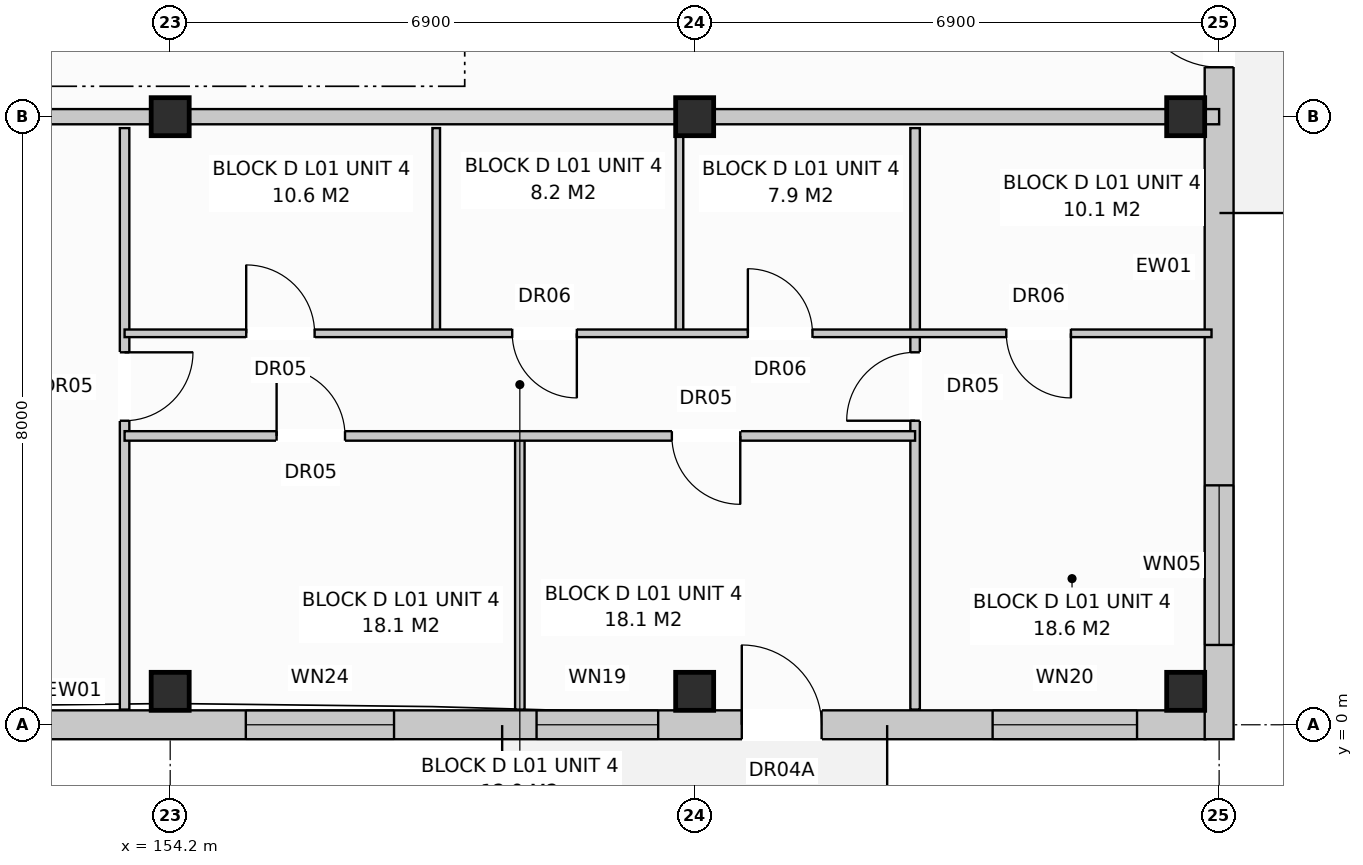
"""IFC4 building model, lengths in metres.
Left out: names, types, materials, properties, quantities, classifications, styles, units other than length and angle.
Written with IfcOpenShell. Run it as: python <this file> out.ifc"""

import sys

from ifc_helpers import new_model, si_unit, direction, frame, frame_2d, origin, origin_with_axes, origin_2d, place, context, subcontext, project, spatial, rectangle, extrude, element, fill, save


model = new_model("IFC4")
c1 = context("Model", 3, precision=1e-05, world=origin(), true_north=direction((0.0, 1.0)))
c2 = subcontext(c1, "Body", "Model", "MODEL_VIEW")
j1 = project(units=[si_unit("LENGTHUNIT", "METRE"), si_unit("PLANEANGLEUNIT", "RADIAN")], contexts=[c1])
p1 = place(None, origin())
s1 = spatial("IfcSite", under=j1, at=p1, CompositionType="ELEMENT")
p2 = place(p1, origin())
s2 = spatial("IfcBuilding", under=s1, at=p2, CompositionType="ELEMENT")
p3 = place(p2, frame((0.0, 0.0, 4.4)))
s3 = spatial("IfcBuildingStorey", under=s2, at=p3, CompositionType="ELEMENT", Elevation=4.4)
for number, where, z_axis, x_axis in (
    (1, (154.2, 0.44, 0.0), (0.0, 0.0, 1.0), (1.0, 0.0, 0.0)),
    (2, (154.2, 8.0, 0.0), (0.0, 0.0, 1.0), (1.0, 0.0, 0.0)),
    (3, (161.1, 0.44, 0.0), (0.0, 0.0, 1.0), (1.0, 0.0, 0.0)),
    (4, (161.1, 8.0, 0.0), (0.0, 0.0, 1.0), (1.0, 0.0, 0.0)),
    (5, (167.56, 0.44, 0.0), (0.0, 0.0, 1.0), (1.0, 0.0, 0.0)),
    (6, (167.56, 8.0, 0.0), (0.0, 0.0, 1.0), (1.0, 0.0, 0.0)),
):
    element("IfcColumn", number, at=place(p3, frame(where, z_axis=z_axis, x_axis=x_axis)), inside=s3, PredefinedType="COLUMN", context=c2, shape_type="SweptSolid", body=[
        extrude(rectangle(XDim=0.5, YDim=0.5, at=origin_2d()), origin(), (0.0, 0.0, 1.0), 3.6),
    ])
p4 = place(p3, frame((112.98, 0.0, 0.0), z_axis=(0.0, 0.0, 1.0), x_axis=(1.0, 0.0, 0.0)))
e7 = element("IfcWall", 7, at=p4, inside=s3, PredefinedType="STANDARD", context=c2, shape_type="SweptSolid", body=[
    extrude(rectangle(XDim=54.84, YDim=0.38, at=frame_2d((27.42, 0.0))), origin(), (0.0, 0.0, 1.0), 3.33),
])
p5 = place(p4, frame((5.04, 0.0, 0.0)))
e8 = element("IfcOpeningElement", 8, at=p5, cuts=e7, PredefinedType="OPENING", context=c2, shape_type="SweptSolid", body=[
    extrude(rectangle(XDim=1.05, YDim=2.12, at=frame_2d((0.525, 1.06))), frame((0.0, 0.202, 0.0), z_axis=(0.0, -1.0, 0.0), x_axis=(1.0, 0.0, 0.0)), (0.0, 0.0, 1.0), 0.404),
])
p6 = place(p4, frame((18.857, 0.0, 0.0)))
e9 = element("IfcOpeningElement", 9, at=p6, cuts=e7, PredefinedType="OPENING", context=c2, shape_type="SweptSolid", body=[
    extrude(rectangle(XDim=1.05, YDim=2.12, at=frame_2d((0.525, 1.06))), frame((0.0, 0.202, 0.0), z_axis=(0.0, -1.0, 0.0), x_axis=(1.0, 0.0, 0.0)), (0.0, 0.0, 1.0), 0.404),
])
p7 = place(p4, frame((32.657, 0.0, 0.0)))
e10 = element("IfcOpeningElement", 10, at=p7, cuts=e7, PredefinedType="OPENING", context=c2, shape_type="SweptSolid", body=[
    extrude(rectangle(XDim=1.05, YDim=2.12, at=frame_2d((0.525, 1.06))), frame((0.0, 0.202, 0.0), z_axis=(0.0, -1.0, 0.0), x_axis=(1.0, 0.0, 0.0)), (0.0, 0.0, 1.0), 0.404),
])
p8 = place(p4, frame((48.74, 0.0, 0.0)))
e11 = element("IfcOpeningElement", 11, at=p8, cuts=e7, PredefinedType="OPENING", context=c2, shape_type="SweptSolid", body=[
    extrude(rectangle(XDim=1.05, YDim=2.12, at=frame_2d((0.525, 1.06))), frame((0.0, 0.202, 0.0), z_axis=(0.0, -1.0, 0.0), x_axis=(1.0, 0.0, 0.0)), (0.0, 0.0, 1.0), 0.404),
])
p9 = place(p4, frame((0.89, 0.0, 0.8)))
e12 = element("IfcOpeningElement", 12, at=p9, cuts=e7, PredefinedType="OPENING", context=c2, shape_type="SweptSolid", body=[
    extrude(rectangle(XDim=1.8, YDim=1.7, at=frame_2d((0.9, 0.85))), frame((0.0, 0.202, 0.0), z_axis=(0.0, -1.0, 0.0), x_axis=(1.0, 0.0, 0.0)), (0.0, 0.0, 1.0), 0.404),
])
p10 = place(p4, frame((7.94, 0.0, 0.8)))
e13 = element("IfcOpeningElement", 13, at=p10, cuts=e7, PredefinedType="OPENING", context=c2, shape_type="SweptSolid", body=[
    extrude(rectangle(XDim=1.9, YDim=1.85, at=frame_2d((0.95, 0.925))), frame((0.0, 0.202, 0.0), z_axis=(0.0, -1.0, 0.0), x_axis=(1.0, 0.0, 0.0)), (0.0, 0.0, 1.0), 0.404),
])
p11 = place(p4, frame((11.215, 0.0, 0.8)))
e14 = element("IfcOpeningElement", 14, at=p11, cuts=e7, PredefinedType="OPENING", context=c2, shape_type="SweptSolid", body=[
    extrude(rectangle(XDim=1.95, YDim=1.65, at=frame_2d((0.975, 0.825))), frame((0.0, 0.202, 0.0), z_axis=(0.0, -1.0, 0.0), x_axis=(1.0, 0.0, 0.0)), (0.0, 0.0, 1.0), 0.404),
])
p12 = place(p4, frame((16.79, 0.0, 0.8)))
e15 = element("IfcOpeningElement", 15, at=p12, cuts=e7, PredefinedType="OPENING", context=c2, shape_type="SweptSolid", body=[
    extrude(rectangle(XDim=1.8, YDim=1.7, at=frame_2d((0.9, 0.85))), frame((0.0, 0.202, 0.0), z_axis=(0.0, -1.0, 0.0), x_axis=(1.0, 0.0, 0.0)), (0.0, 0.0, 1.0), 0.404),
])
p13 = place(p4, frame((22.24, 0.0, 0.8)))
e16 = element("IfcOpeningElement", 16, at=p13, cuts=e7, PredefinedType="OPENING", context=c2, shape_type="SweptSolid", body=[
    extrude(rectangle(XDim=1.9, YDim=1.85, at=frame_2d((0.95, 0.925))), frame((0.0, 0.202, 0.0), z_axis=(0.0, -1.0, 0.0), x_axis=(1.0, 0.0, 0.0)), (0.0, 0.0, 1.0), 0.404),
])
p14 = place(p4, frame((27.873, 0.0, 0.8)))
e17 = element("IfcOpeningElement", 17, at=p14, cuts=e7, PredefinedType="OPENING", context=c2, shape_type="SweptSolid", body=[
    extrude(rectangle(XDim=1.95, YDim=1.65, at=frame_2d((0.975, 0.825))), frame((0.0, 0.202, 0.0), z_axis=(0.0, -1.0, 0.0), x_axis=(1.0, 0.0, 0.0)), (0.0, 0.0, 1.0), 0.404),
])
p15 = place(p4, frame((30.59, 0.0, 0.8)))
e18 = element("IfcOpeningElement", 18, at=p15, cuts=e7, PredefinedType="OPENING", context=c2, shape_type="SweptSolid", body=[
    extrude(rectangle(XDim=1.8, YDim=1.7, at=frame_2d((0.9, 0.85))), frame((0.0, 0.202, 0.0), z_axis=(0.0, -1.0, 0.0), x_axis=(1.0, 0.0, 0.0)), (0.0, 0.0, 1.0), 0.404),
])
p16 = place(p4, frame((36.54, 0.0, 0.8)))
e19 = element("IfcOpeningElement", 19, at=p16, cuts=e7, PredefinedType="OPENING", context=c2, shape_type="SweptSolid", body=[
    extrude(rectangle(XDim=1.9, YDim=1.85, at=frame_2d((0.95, 0.925))), frame((0.0, 0.202, 0.0), z_axis=(0.0, -1.0, 0.0), x_axis=(1.0, 0.0, 0.0)), (0.0, 0.0, 1.0), 0.404),
])
p17 = place(p4, frame((42.215, 0.0, 0.8)))
e20 = element("IfcOpeningElement", 20, at=p17, cuts=e7, PredefinedType="OPENING", context=c2, shape_type="SweptSolid", body=[
    extrude(rectangle(XDim=1.95, YDim=1.65, at=frame_2d((0.975, 0.825))), frame((0.0, 0.202, 0.0), z_axis=(0.0, -1.0, 0.0), x_axis=(1.0, 0.0, 0.0)), (0.0, 0.0, 1.0), 0.404),
])
p18 = place(p4, frame((46.04, 0.0, 0.85)))
e21 = element("IfcOpeningElement", 21, at=p18, cuts=e7, PredefinedType="OPENING", context=c2, shape_type="SweptSolid", body=[
    extrude(rectangle(XDim=1.6, YDim=1.85, at=frame_2d((0.8, 0.925))), frame((0.0, 0.202, 0.0), z_axis=(0.0, -1.0, 0.0), x_axis=(1.0, 0.0, 0.0)), (0.0, 0.0, 1.0), 0.404),
])
p19 = place(p4, frame((52.04, 0.0, 0.8)))
e22 = element("IfcOpeningElement", 22, at=p19, cuts=e7, PredefinedType="OPENING", context=c2, shape_type="SweptSolid", body=[
    extrude(rectangle(XDim=1.9, YDim=1.85, at=frame_2d((0.95, 0.925))), frame((0.0, 0.202, 0.0), z_axis=(0.0, -1.0, 0.0), x_axis=(1.0, 0.0, 0.0)), (0.0, 0.0, 1.0), 0.404),
])
p20 = place(p3, frame((168.0, -0.19, 0.0), z_axis=(0.0, 0.0, 1.0), x_axis=(0.0, 1.0, 0.0)))
e23 = element("IfcWall", 23, at=p20, inside=s3, PredefinedType="STANDARD", context=c2, shape_type="SweptSolid", body=[
    extrude(rectangle(XDim=18.78, YDim=0.38, at=frame_2d((9.39, 0.0))), origin(), (0.0, 0.0, 1.0), 3.33),
])
p21 = place(p20, frame((8.84, 0.0, 0.0)))
e24 = element("IfcOpeningElement", 24, at=p21, cuts=e23, PredefinedType="OPENING", context=c2, shape_type="SweptSolid", body=[
    extrude(rectangle(XDim=1.1, YDim=2.1, at=frame_2d((0.55, 1.05))), frame((0.0, 0.202, 0.0), z_axis=(0.0, -1.0, 0.0), x_axis=(1.0, 0.0, 0.0)), (0.0, 0.0, 1.0), 0.404),
])
p22 = place(p20, frame((1.24, 0.0, 0.72)))
e25 = element("IfcOpeningElement", 25, at=p22, cuts=e23, PredefinedType="OPENING", context=c2, shape_type="SweptSolid", body=[
    extrude(rectangle(XDim=2.1, YDim=1.9, at=frame_2d((1.05, 0.95))), frame((0.0, 0.202, 0.0), z_axis=(0.0, -1.0, 0.0), x_axis=(1.0, 0.0, 0.0)), (0.0, 0.0, 1.0), 0.404),
])
p23 = place(p20, frame((15.44, 0.0, 0.72)))
e26 = element("IfcOpeningElement", 26, at=p23, cuts=e23, PredefinedType="OPENING", context=c2, shape_type="SweptSolid", body=[
    extrude(rectangle(XDim=2.1, YDim=1.9, at=frame_2d((1.05, 0.95))), frame((0.0, 0.202, 0.0), z_axis=(0.0, -1.0, 0.0), x_axis=(1.0, 0.0, 0.0)), (0.0, 0.0, 1.0), 0.404),
])
p24 = place(p3, frame((147.3, 8.0, 0.0), z_axis=(0.0, 0.0, 1.0), x_axis=(1.0, 0.0, 0.0)))
e27 = element("IfcWall", 27, at=p24, inside=s3, PredefinedType="PARTITIONING", context=c2, shape_type="SweptSolid", body=[
    extrude(rectangle(XDim=20.7, YDim=0.2, at=frame_2d((10.35, 0.0))), origin(), (0.0, 0.0, 1.0), 2.77),
])
p25 = place(p24, frame((2.4, 0.0, 0.0)))
e28 = element("IfcOpeningElement", 28, at=p25, cuts=e27, PredefinedType="OPENING", context=c2, shape_type="SweptSolid", body=[
    extrude(rectangle(XDim=0.95, YDim=2.15, at=frame_2d((0.475, 1.075))), frame((0.0, 0.112, 0.0), z_axis=(0.0, -1.0, 0.0), x_axis=(1.0, 0.0, 0.0)), (0.0, 0.0, 1.0), 0.224),
])
p26 = place(p3, frame((153.6, 7.85, 0.0), z_axis=(0.0, 0.0, 1.0), x_axis=(0.0, -1.0, 0.0)))
e29 = element("IfcWall", 29, at=p26, inside=s3, PredefinedType="PARTITIONING", context=c2, shape_type="SweptSolid", body=[
    extrude(rectangle(XDim=7.65, YDim=0.125, at=frame_2d((3.825, 0.0))), origin(), (0.0, 0.0, 1.0), 3.33),
])
p27 = place(p26, frame((2.95, 0.0, 0.0)))
e30 = element("IfcOpeningElement", 30, at=p27, cuts=e29, PredefinedType="OPENING", context=c2, shape_type="SweptSolid", body=[
    extrude(rectangle(XDim=0.9, YDim=2.1, at=frame_2d((0.45, 1.05))), frame((0.0, 0.074, 0.0), z_axis=(0.0, -1.0, 0.0), x_axis=(1.0, 0.0, 0.0)), (0.0, 0.0, 1.0), 0.149),
])
p28 = place(p3, frame((157.7, 7.85, 0.0), z_axis=(0.0, 0.0, 1.0), x_axis=(0.0, -1.0, 0.0)))
e31 = element("IfcWall", 31, at=p28, inside=s3, PredefinedType="PARTITIONING", context=c2, shape_type="SweptSolid", body=[
    extrude(rectangle(XDim=2.7, YDim=0.1, at=frame_2d((1.35, 0.0))), origin(), (0.0, 0.0, 1.0), 3.33),
])
p29 = place(p3, frame((160.9, 7.85, 0.0), z_axis=(0.0, 0.0, 1.0), x_axis=(0.0, -1.0, 0.0)))
e32 = element("IfcWall", 32, at=p29, inside=s3, PredefinedType="PARTITIONING", context=c2, shape_type="SweptSolid", body=[
    extrude(rectangle(XDim=2.7, YDim=0.1, at=frame_2d((1.35, 0.0))), origin(), (0.0, 0.0, 1.0), 2.77),
])
p30 = place(p3, frame((158.8, 3.8, 0.0), z_axis=(0.0, 0.0, 1.0), x_axis=(0.0, -1.0, 0.0)))
e33 = element("IfcWall", 33, at=p30, inside=s3, PredefinedType="PARTITIONING", context=c2, shape_type="SweptSolid", body=[
    extrude(rectangle(XDim=3.6, YDim=0.125, at=frame_2d((1.8, 0.0))), origin(), (0.0, 0.0, 1.0), 3.33),
])
p31 = place(p3, frame((164.0, 7.85, 0.0), z_axis=(0.0, 0.0, 1.0), x_axis=(0.0, -1.0, 0.0)))
e34 = element("IfcWall", 34, at=p31, inside=s3, PredefinedType="PARTITIONING", context=c2, shape_type="SweptSolid", body=[
    extrude(rectangle(XDim=7.65, YDim=0.125, at=frame_2d((3.825, 0.0))), origin(), (0.0, 0.0, 1.0), 3.33),
])
p32 = place(p31, frame((2.95, 0.0, 0.0)))
e35 = element("IfcOpeningElement", 35, at=p32, cuts=e34, PredefinedType="OPENING", context=c2, shape_type="SweptSolid", body=[
    extrude(rectangle(XDim=0.9, YDim=2.1, at=frame_2d((0.45, 1.05))), frame((0.0, 0.074, 0.0), z_axis=(0.0, -1.0, 0.0), x_axis=(1.0, 0.0, 0.0)), (0.0, 0.0, 1.0), 0.149),
])
p33 = place(p3, frame((153.6, 5.15, 0.0), z_axis=(0.0, 0.0, 1.0), x_axis=(1.0, 0.0, 0.0)))
e36 = element("IfcWall", 36, at=p33, inside=s3, PredefinedType="PARTITIONING", context=c2, shape_type="SweptSolid", body=[
    extrude(rectangle(XDim=14.3, YDim=0.1, at=frame_2d((7.15, 0.0))), origin(), (0.0, 0.0, 1.0), 3.33),
])
p34 = place(p33, frame((1.6, 0.0, 0.0)))
e37 = element("IfcOpeningElement", 37, at=p34, cuts=e36, PredefinedType="OPENING", context=c2, shape_type="SweptSolid", body=[
    extrude(rectangle(XDim=0.9, YDim=2.1, at=frame_2d((0.45, 1.05))), frame((0.0, 0.062, 0.0), z_axis=(0.0, -1.0, 0.0), x_axis=(1.0, 0.0, 0.0)), (0.0, 0.0, 1.0), 0.124),
])
p35 = place(p33, frame((5.1, 0.0, 0.0)))
e38 = element("IfcOpeningElement", 38, at=p35, cuts=e36, PredefinedType="OPENING", context=c2, shape_type="SweptSolid", body=[
    extrude(rectangle(XDim=0.85, YDim=2.05, at=frame_2d((0.425, 1.025))), frame((0.0, 0.062, 0.0), z_axis=(0.0, -1.0, 0.0), x_axis=(1.0, 0.0, 0.0)), (0.0, 0.0, 1.0), 0.124),
])
p36 = place(p33, frame((8.2, 0.0, 0.0)))
e39 = element("IfcOpeningElement", 39, at=p36, cuts=e36, PredefinedType="OPENING", context=c2, shape_type="SweptSolid", body=[
    extrude(rectangle(XDim=0.85, YDim=2.05, at=frame_2d((0.425, 1.025))), frame((0.0, 0.062, 0.0), z_axis=(0.0, -1.0, 0.0), x_axis=(1.0, 0.0, 0.0)), (0.0, 0.0, 1.0), 0.124),
])
p37 = place(p33, frame((11.6, 0.0, 0.0)))
e40 = element("IfcOpeningElement", 40, at=p37, cuts=e36, PredefinedType="OPENING", context=c2, shape_type="SweptSolid", body=[
    extrude(rectangle(XDim=0.85, YDim=2.05, at=frame_2d((0.425, 1.025))), frame((0.0, 0.062, 0.0), z_axis=(0.0, -1.0, 0.0), x_axis=(1.0, 0.0, 0.0)), (0.0, 0.0, 1.0), 0.124),
])
p38 = place(p3, frame((153.6, 3.8, 0.0), z_axis=(0.0, 0.0, 1.0), x_axis=(1.0, 0.0, 0.0)))
e41 = element("IfcWall", 41, at=p38, inside=s3, PredefinedType="PARTITIONING", context=c2, shape_type="SweptSolid", body=[
    extrude(rectangle(XDim=10.4, YDim=0.125, at=frame_2d((5.2, 0.0))), origin(), (0.0, 0.0, 1.0), 3.33),
])
p39 = place(p38, frame((2.0, 0.0, 0.0)))
e42 = element("IfcOpeningElement", 42, at=p39, cuts=e41, PredefinedType="OPENING", context=c2, shape_type="SweptSolid", body=[
    extrude(rectangle(XDim=0.9, YDim=2.1, at=frame_2d((0.45, 1.05))), frame((0.0, 0.074, 0.0), z_axis=(0.0, -1.0, 0.0), x_axis=(1.0, 0.0, 0.0)), (0.0, 0.0, 1.0), 0.149),
])
p40 = place(p38, frame((7.2, 0.0, 0.0)))
e43 = element("IfcOpeningElement", 43, at=p40, cuts=e41, PredefinedType="OPENING", context=c2, shape_type="SweptSolid", body=[
    extrude(rectangle(XDim=0.9, YDim=2.1, at=frame_2d((0.45, 1.05))), frame((0.0, 0.074, 0.0), z_axis=(0.0, -1.0, 0.0), x_axis=(1.0, 0.0, 0.0)), (0.0, 0.0, 1.0), 0.149),
])
p41 = place(p8, origin_with_axes())
e44 = element("IfcDoor", 44, at=p41, inside=s3, OperationType="SINGLE_SWING_LEFT", PredefinedType="DOOR", context=c2, shape_type="SweptSolid", body=[
    extrude(rectangle(XDim=1.05, YDim=2.12, at=frame_2d((0.525, 1.06))), frame((0.0, 0.025, 0.0), z_axis=(0.0, -1.0, 0.0), x_axis=(1.0, 0.0, 0.0)), (0.0, 0.0, 1.0), 0.05),
])
fill(e11, e44)
p42 = place(p17, origin_with_axes())
e45 = element("IfcWindow", 45, at=p42, inside=s3, PartitioningType="SINGLE_PANEL", PredefinedType="WINDOW", context=c2, shape_type="SweptSolid", body=[
    extrude(rectangle(XDim=1.95, YDim=1.65, at=frame_2d((0.975, 0.825))), frame((0.0, 0.03, 0.0), z_axis=(0.0, -1.0, 0.0), x_axis=(1.0, 0.0, 0.0)), (0.0, 0.0, 1.0), 0.06),
])
fill(e20, e45)
p43 = place(p18, origin_with_axes())
e46 = element("IfcWindow", 46, at=p43, inside=s3, PartitioningType="SINGLE_PANEL", PredefinedType="WINDOW", context=c2, shape_type="SweptSolid", body=[
    extrude(rectangle(XDim=1.6, YDim=1.85, at=frame_2d((0.8, 0.925))), frame((0.0, 0.03, 0.0), z_axis=(0.0, -1.0, 0.0), x_axis=(1.0, 0.0, 0.0)), (0.0, 0.0, 1.0), 0.06),
])
fill(e21, e46)
p44 = place(p19, origin_with_axes())
e47 = element("IfcWindow", 47, at=p44, inside=s3, PartitioningType="SINGLE_PANEL", PredefinedType="WINDOW", context=c2, shape_type="SweptSolid", body=[
    extrude(rectangle(XDim=1.9, YDim=1.85, at=frame_2d((0.95, 0.925))), frame((0.0, 0.03, 0.0), z_axis=(0.0, -1.0, 0.0), x_axis=(1.0, 0.0, 0.0)), (0.0, 0.0, 1.0), 0.06),
])
fill(e22, e47)
p45 = place(p21, origin_with_axes())
e48 = element("IfcDoor", 48, at=p45, inside=s3, OperationType="SINGLE_SWING_RIGHT", PredefinedType="DOOR", context=c2, shape_type="SweptSolid", body=[
    extrude(rectangle(XDim=1.1, YDim=2.1, at=frame_2d((0.55, 1.05))), frame((0.0, 0.025, 0.0), z_axis=(0.0, -1.0, 0.0), x_axis=(1.0, 0.0, 0.0)), (0.0, 0.0, 1.0), 0.05),
])
fill(e24, e48)
p46 = place(p22, origin_with_axes())
e49 = element("IfcWindow", 49, at=p46, inside=s3, PartitioningType="SINGLE_PANEL", PredefinedType="WINDOW", context=c2, shape_type="SweptSolid", body=[
    extrude(rectangle(XDim=2.1, YDim=1.9, at=frame_2d((1.05, 0.95))), frame((0.0, 0.03, 0.0), z_axis=(0.0, -1.0, 0.0), x_axis=(1.0, 0.0, 0.0)), (0.0, 0.0, 1.0), 0.06),
])
fill(e25, e49)
p47 = place(p27, origin_with_axes())
e50 = element("IfcDoor", 50, at=p47, inside=s3, OperationType="SINGLE_SWING_LEFT", PredefinedType="DOOR", context=c2, shape_type="SweptSolid", body=[
    extrude(rectangle(XDim=0.9, YDim=2.1, at=frame_2d((0.45, 1.05))), frame((0.0, 0.025, 0.0), z_axis=(0.0, -1.0, 0.0), x_axis=(1.0, 0.0, 0.0)), (0.0, 0.0, 1.0), 0.05),
])
fill(e30, e50)
p48 = place(p32, frame((0.9, 0.0, 0.0), z_axis=(0.0, 0.0, 1.0), x_axis=(-1.0, 0.0, 0.0)))
e51 = element("IfcDoor", 51, at=p48, inside=s3, OperationType="SINGLE_SWING_RIGHT", PredefinedType="DOOR", context=c2, shape_type="SweptSolid", body=[
    extrude(rectangle(XDim=0.9, YDim=2.1, at=frame_2d((0.45, 1.05))), frame((0.0, 0.025, 0.0), z_axis=(0.0, -1.0, 0.0), x_axis=(1.0, 0.0, 0.0)), (0.0, 0.0, 1.0), 0.05),
])
fill(e35, e51)
p49 = place(p34, origin_with_axes())
e52 = element("IfcDoor", 52, at=p49, inside=s3, OperationType="SINGLE_SWING_LEFT", PredefinedType="DOOR", context=c2, shape_type="SweptSolid", body=[
    extrude(rectangle(XDim=0.9, YDim=2.1, at=frame_2d((0.45, 1.05))), frame((0.0, 0.025, 0.0), z_axis=(0.0, -1.0, 0.0), x_axis=(1.0, 0.0, 0.0)), (0.0, 0.0, 1.0), 0.05),
])
fill(e37, e52)
p50 = place(p35, frame((0.85, 0.0, 0.0), z_axis=(0.0, 0.0, 1.0), x_axis=(-1.0, 0.0, 0.0)))
e53 = element("IfcDoor", 53, at=p50, inside=s3, OperationType="SINGLE_SWING_RIGHT", PredefinedType="DOOR", context=c2, shape_type="SweptSolid", body=[
    extrude(rectangle(XDim=0.85, YDim=2.05, at=frame_2d((0.425, 1.025))), frame((0.0, 0.025, 0.0), z_axis=(0.0, -1.0, 0.0), x_axis=(1.0, 0.0, 0.0)), (0.0, 0.0, 1.0), 0.05),
])
fill(e38, e53)
p51 = place(p36, origin_with_axes())
e54 = element("IfcDoor", 54, at=p51, inside=s3, OperationType="SINGLE_SWING_LEFT", PredefinedType="DOOR", context=c2, shape_type="SweptSolid", body=[
    extrude(rectangle(XDim=0.85, YDim=2.05, at=frame_2d((0.425, 1.025))), frame((0.0, 0.025, 0.0), z_axis=(0.0, -1.0, 0.0), x_axis=(1.0, 0.0, 0.0)), (0.0, 0.0, 1.0), 0.05),
])
fill(e39, e54)
p52 = place(p37, frame((0.85, 0.0, 0.0), z_axis=(0.0, 0.0, 1.0), x_axis=(-1.0, 0.0, 0.0)))
e55 = element("IfcDoor", 55, at=p52, inside=s3, OperationType="SINGLE_SWING_RIGHT", PredefinedType="DOOR", context=c2, shape_type="SweptSolid", body=[
    extrude(rectangle(XDim=0.85, YDim=2.05, at=frame_2d((0.425, 1.025))), frame((0.0, 0.025, 0.0), z_axis=(0.0, -1.0, 0.0), x_axis=(1.0, 0.0, 0.0)), (0.0, 0.0, 1.0), 0.05),
])
fill(e40, e55)
p53 = place(p39, origin_with_axes())
e56 = element("IfcDoor", 56, at=p53, inside=s3, OperationType="SINGLE_SWING_LEFT", PredefinedType="DOOR", context=c2, shape_type="SweptSolid", body=[
    extrude(rectangle(XDim=0.9, YDim=2.1, at=frame_2d((0.45, 1.05))), frame((0.0, 0.025, 0.0), z_axis=(0.0, -1.0, 0.0), x_axis=(1.0, 0.0, 0.0)), (0.0, 0.0, 1.0), 0.05),
])
fill(e42, e56)
p54 = place(p40, frame((0.9, 0.0, 0.0), z_axis=(0.0, 0.0, 1.0), x_axis=(-1.0, 0.0, 0.0)))
e57 = element("IfcDoor", 57, at=p54, inside=s3, OperationType="SINGLE_SWING_RIGHT", PredefinedType="DOOR", context=c2, shape_type="SweptSolid", body=[
    extrude(rectangle(XDim=0.9, YDim=2.1, at=frame_2d((0.45, 1.05))), frame((0.0, 0.025, 0.0), z_axis=(0.0, -1.0, 0.0), x_axis=(1.0, 0.0, 0.0)), (0.0, 0.0, 1.0), 0.05),
])
fill(e43, e57)
save(model, sys.argv[1])
